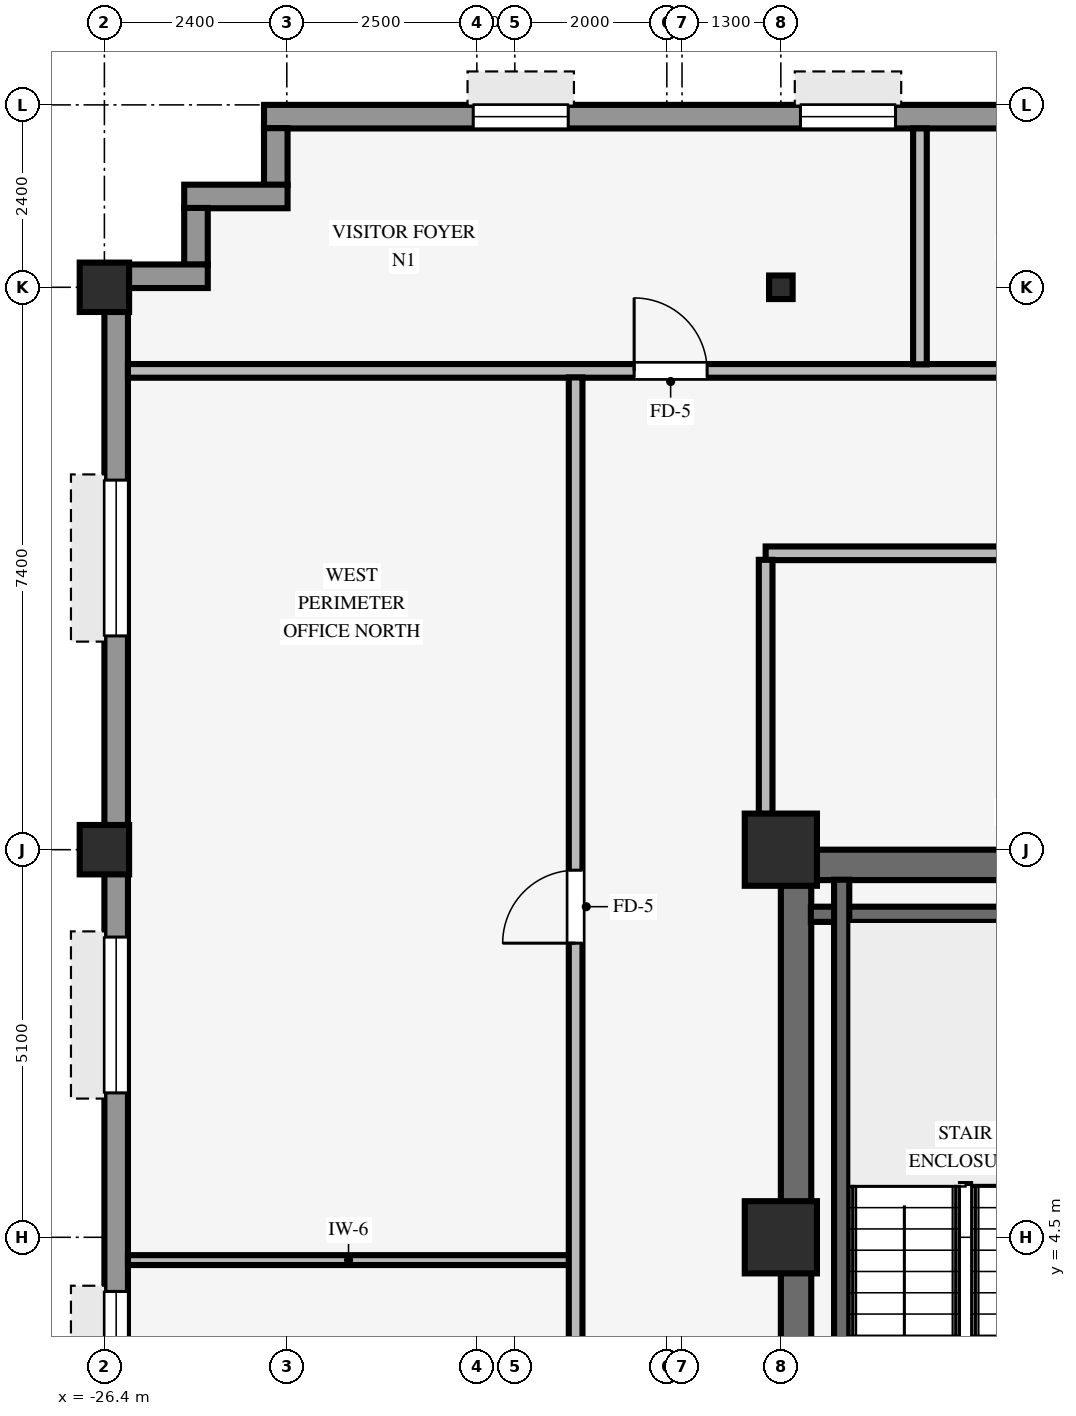
"""IFC4 building model, lengths in metres.
Left out: names, types, materials, properties, quantities, classifications, styles, units other than length and angle.
Written with IfcOpenShell. Run it as: python <this file> out.ifc"""

import sys

from ifc_helpers import new_model, si_unit, direction, frame, frame_2d, origin, origin_2d, place, context, subcontext, project, spatial, rectangle, hollow_rectangle, i_section, extrude, source, transform, mapped, element, fill, save


model = new_model("IFC4")
c1 = context("Model", 3, precision=1e-05, world=origin(), true_north=direction((0.0, 1.0)))
c2 = subcontext(c1, "Body", "Model", "MODEL_VIEW")
j1 = project(units=[si_unit("LENGTHUNIT", "METRE"), si_unit("PLANEANGLEUNIT", "RADIAN")], contexts=[c1])
p1 = place(None, origin())
s1 = spatial("IfcSite", under=j1, at=p1, CompositionType="ELEMENT")
p2 = place(p1, origin())
s2 = spatial("IfcBuilding", under=s1, at=p2, CompositionType="ELEMENT")
p3 = place(p2, frame((0.0, 0.0, 182.25)))
s3 = spatial("IfcBuildingStorey", under=s2, at=p3, CompositionType="ELEMENT", Elevation=182.25)
p4 = place(p3, frame((-17.5, 9.4, 0.0), z_axis=(0.0, 0.0, 1.0), x_axis=(1.0, 0.0, 0.0)))
e1 = element("IfcWall", 1, at=p4, inside=s3, PredefinedType="SHEAR", context=c2, shape_type="SweptSolid", body=[
    extrude(rectangle(XDim=8.5, YDim=0.4, at=frame_2d((4.25, 0.0))), origin(), (0.0, 0.0, 1.0), 3.25),
])
p5 = place(p3, frame((-17.3, -9.205, 0.0), z_axis=(0.0, 0.0, 1.0), x_axis=(0.0, 1.0, 0.0)))
e2 = element("IfcWall", 2, at=p5, inside=s3, PredefinedType="SHEAR", context=c2, shape_type="SweptSolid", body=[
    extrude(rectangle(XDim=18.41, YDim=0.4, at=frame_2d((9.205, 0.0))), origin(), (0.0, 0.0, 1.0), 3.25),
])
for number, where, z_axis, x_axis in (
    (3, (-17.5, 4.5, 0.0), (0.0, 0.0, 1.0), (1.0, 0.0, 0.0)),
    (4, (-17.5, 9.6, 0.0), (0.0, 0.0, 1.0), (1.0, 0.0, 0.0)),
):
    element("IfcColumn", number, at=place(p3, frame(where, z_axis=z_axis, x_axis=x_axis)), inside=s3, PredefinedType="COLUMN", context=c2, shape_type="SweptSolid", body=[
        extrude(rectangle(XDim=0.95, YDim=0.95, at=origin_2d()), origin(), (0.0, 0.0, 1.0), 3.25),
    ])
for number, where, z_axis, x_axis in (
    (5, (-26.4, 9.6, 0.0), (0.0, 0.0, 1.0), (1.0, 0.0, 0.0)),
    (6, (-26.4, 17.0, 0.0), (0.0, 0.0, 1.0), (1.0, 0.0, 0.0)),
):
    element("IfcColumn", number, at=place(p3, frame(where, z_axis=z_axis, x_axis=x_axis)), inside=s3, PredefinedType="COLUMN", context=c2, shape_type="SweptSolid", body=[
        extrude(hollow_rectangle(XDim=0.65, YDim=0.65, WallThickness=0.04, InnerFilletRadius=0.04, OuterFilletRadius=0.08, at=origin_2d()), origin(), (0.0, 0.0, 1.0), 3.25),
    ])
p6 = place(p3, frame((-17.5, 17.0, 0.0), z_axis=(0.0, 0.0, 1.0), x_axis=(1.0, 0.0, 0.0)))
e7 = element("IfcColumn", 7, at=p6, inside=s3, PredefinedType="COLUMN", context=c2, shape_type="SweptSolid", body=[
    extrude(i_section(OverallWidth=0.31, OverallDepth=0.31, WebThickness=0.015, FlangeThickness=0.015, FilletRadius=0.015, at=origin_2d()), origin(), (0.0, 0.0, 1.0), 3.25),
])
p7 = place(p3, frame((-24.3, 19.245, 0.0), z_axis=(0.0, 0.0, 1.0), x_axis=(1.0, 0.0, 0.0)))
e8 = element("IfcWall", 8, at=p7, inside=s3, PredefinedType="STANDARD", context=c2, shape_type="SweptSolid", body=[
    extrude(rectangle(XDim=44.8, YDim=0.31, at=frame_2d((22.4, 0.0))), origin(), (0.0, 0.0, 1.0), 2.585),
])
p8 = place(p7, frame((2.753, 0.0, 0.8)))
e9 = element("IfcOpeningElement", 9, at=p8, cuts=e8, PredefinedType="OPENING", context=c2, shape_type="SweptSolid", body=[
    extrude(rectangle(XDim=1.25, YDim=1.52, at=frame_2d((0.625, 0.76))), frame((0.0, 0.165, 0.0), z_axis=(0.0, -1.0, 0.0), x_axis=(1.0, 0.0, 0.0)), (0.0, 0.0, 1.0), 0.33),
])
p9 = place(p7, frame((7.058, 0.0, 0.8)))
e10 = element("IfcOpeningElement", 10, at=p9, cuts=e8, PredefinedType="OPENING", context=c2, shape_type="SweptSolid", body=[
    extrude(rectangle(XDim=1.25, YDim=1.52, at=frame_2d((0.625, 0.76))), frame((0.0, 0.165, 0.0), z_axis=(0.0, -1.0, 0.0), x_axis=(1.0, 0.0, 0.0)), (0.0, 0.0, 1.0), 0.33),
])
p10 = place(p7, frame((12.264, 0.0, 0.8)))
e11 = element("IfcOpeningElement", 11, at=p10, cuts=e8, PredefinedType="OPENING", context=c2, shape_type="SweptSolid", body=[
    extrude(rectangle(XDim=1.25, YDim=1.52, at=frame_2d((0.625, 0.76))), frame((0.0, 0.165, 0.0), z_axis=(0.0, -1.0, 0.0), x_axis=(1.0, 0.0, 0.0)), (0.0, 0.0, 1.0), 0.33),
])
p11 = place(p7, frame((17.919, 0.0, 0.8)))
e12 = element("IfcOpeningElement", 12, at=p11, cuts=e8, PredefinedType="OPENING", context=c2, shape_type="SweptSolid", body=[
    extrude(rectangle(XDim=1.25, YDim=1.52, at=frame_2d((0.625, 0.76))), frame((0.0, 0.165, 0.0), z_axis=(0.0, -1.0, 0.0), x_axis=(1.0, 0.0, 0.0)), (0.0, 0.0, 1.0), 0.33),
])
p12 = place(p7, frame((21.775, 0.0, 0.8)))
e13 = element("IfcOpeningElement", 13, at=p12, cuts=e8, PredefinedType="OPENING", context=c2, shape_type="SweptSolid", body=[
    extrude(rectangle(XDim=1.25, YDim=1.52, at=frame_2d((0.625, 0.76))), frame((0.0, 0.165, 0.0), z_axis=(0.0, -1.0, 0.0), x_axis=(1.0, 0.0, 0.0)), (0.0, 0.0, 1.0), 0.33),
])
p13 = place(p7, frame((26.981, 0.0, 0.8)))
e14 = element("IfcOpeningElement", 14, at=p13, cuts=e8, PredefinedType="OPENING", context=c2, shape_type="SweptSolid", body=[
    extrude(rectangle(XDim=1.25, YDim=1.52, at=frame_2d((0.625, 0.76))), frame((0.0, 0.165, 0.0), z_axis=(0.0, -1.0, 0.0), x_axis=(1.0, 0.0, 0.0)), (0.0, 0.0, 1.0), 0.33),
])
p14 = place(p7, frame((31.286, 0.0, 0.8)))
e15 = element("IfcOpeningElement", 15, at=p14, cuts=e8, PredefinedType="OPENING", context=c2, shape_type="SweptSolid", body=[
    extrude(rectangle(XDim=1.25, YDim=1.52, at=frame_2d((0.625, 0.76))), frame((0.0, 0.165, 0.0), z_axis=(0.0, -1.0, 0.0), x_axis=(1.0, 0.0, 0.0)), (0.0, 0.0, 1.0), 0.33),
])
p15 = place(p7, frame((36.042, 0.0, 0.8)))
e16 = element("IfcOpeningElement", 16, at=p15, cuts=e8, PredefinedType="OPENING", context=c2, shape_type="SweptSolid", body=[
    extrude(rectangle(XDim=1.25, YDim=1.52, at=frame_2d((0.625, 0.76))), frame((0.0, 0.165, 0.0), z_axis=(0.0, -1.0, 0.0), x_axis=(1.0, 0.0, 0.0)), (0.0, 0.0, 1.0), 0.33),
])
p16 = place(p7, frame((40.797, 0.0, 0.8)))
e17 = element("IfcOpeningElement", 17, at=p16, cuts=e8, PredefinedType="OPENING", context=c2, shape_type="SweptSolid", body=[
    extrude(rectangle(XDim=1.25, YDim=1.52, at=frame_2d((0.625, 0.76))), frame((0.0, 0.165, 0.0), z_axis=(0.0, -1.0, 0.0), x_axis=(1.0, 0.0, 0.0)), (0.0, 0.0, 1.0), 0.33),
])
p17 = place(p3, frame((-24.145, 18.346, 0.0), z_axis=(0.0, 0.0, 1.0), x_axis=(0.0, 1.0, 0.0)))
e18 = element("IfcWall", 18, at=p17, inside=s3, PredefinedType="STANDARD", context=c2, shape_type="SweptSolid", body=[
    extrude(rectangle(XDim=0.748, YDim=0.31, at=frame_2d((0.374, 0.0))), origin(), (0.0, 0.0, 1.0), 2.335),
])
p18 = place(p3, frame((-25.35, 18.195, 0.0), z_axis=(0.0, 0.0, 1.0), x_axis=(1.0, 0.0, 0.0)))
e19 = element("IfcWall", 19, at=p18, inside=s3, PredefinedType="STANDARD", context=c2, shape_type="SweptSolid", body=[
    extrude(rectangle(XDim=1.36, YDim=0.31, at=frame_2d((0.68, 0.0))), origin(), (0.0, 0.0, 1.0), 2.335),
])
p19 = place(p3, frame((-25.195, 17.296, 0.0), z_axis=(0.0, 0.0, 1.0), x_axis=(0.0, 1.0, 0.0)))
e20 = element("IfcWall", 20, at=p19, inside=s3, PredefinedType="STANDARD", context=c2, shape_type="SweptSolid", body=[
    extrude(rectangle(XDim=0.748, YDim=0.31, at=frame_2d((0.374, 0.0))), origin(), (0.0, 0.0, 1.0), 2.335),
])
p20 = place(p3, frame((-26.4, 17.145, 0.0), z_axis=(0.0, 0.0, 1.0), x_axis=(1.0, 0.0, 0.0)))
e21 = element("IfcWall", 21, at=p20, inside=s3, PredefinedType="STANDARD", context=c2, shape_type="SweptSolid", body=[
    extrude(rectangle(XDim=1.36, YDim=0.31, at=frame_2d((0.68, 0.0))), origin(), (0.0, 0.0, 1.0), 2.335),
])
p21 = place(p3, frame((-26.245, -20.794, 0.0), z_axis=(0.0, 0.0, 1.0), x_axis=(0.0, 1.0, 0.0)))
e22 = element("IfcWall", 22, at=p21, inside=s3, PredefinedType="STANDARD", context=c2, shape_type="SweptSolid", body=[
    extrude(rectangle(XDim=37.788, YDim=0.31, at=frame_2d((18.894, 0.0))), origin(), (0.0, 0.0, 1.0), 2.585),
])
p22 = place(p21, frame((7.644, 0.0, 0.8)))
e23 = element("IfcOpeningElement", 23, at=p22, cuts=e22, PredefinedType="OPENING", context=c2, shape_type="SweptSolid", body=[
    extrude(rectangle(XDim=2.05, YDim=1.52, at=frame_2d((1.025, 0.76))), frame((0.0, 0.165, 0.0), z_axis=(0.0, -1.0, 0.0), x_axis=(1.0, 0.0, 0.0)), (0.0, 0.0, 1.0), 0.33),
])
p23 = place(p21, frame((12.756, 0.0, 0.8)))
e24 = element("IfcOpeningElement", 24, at=p23, cuts=e22, PredefinedType="OPENING", context=c2, shape_type="SweptSolid", body=[
    extrude(rectangle(XDim=2.05, YDim=1.52, at=frame_2d((1.025, 0.76))), frame((0.0, 0.165, 0.0), z_axis=(0.0, -1.0, 0.0), x_axis=(1.0, 0.0, 0.0)), (0.0, 0.0, 1.0), 0.33),
])
p24 = place(p21, frame((17.869, 0.0, 0.8)))
e25 = element("IfcOpeningElement", 25, at=p24, cuts=e22, PredefinedType="OPENING", context=c2, shape_type="SweptSolid", body=[
    extrude(rectangle(XDim=2.05, YDim=1.52, at=frame_2d((1.025, 0.76))), frame((0.0, 0.165, 0.0), z_axis=(0.0, -1.0, 0.0), x_axis=(1.0, 0.0, 0.0)), (0.0, 0.0, 1.0), 0.33),
])
p25 = place(p21, frame((22.531, 0.0, 0.8)))
e26 = element("IfcOpeningElement", 26, at=p25, cuts=e22, PredefinedType="OPENING", context=c2, shape_type="SweptSolid", body=[
    extrude(rectangle(XDim=2.05, YDim=1.52, at=frame_2d((1.025, 0.76))), frame((0.0, 0.165, 0.0), z_axis=(0.0, -1.0, 0.0), x_axis=(1.0, 0.0, 0.0)), (0.0, 0.0, 1.0), 0.33),
])
p26 = place(p21, frame((27.194, 0.0, 0.8)))
e27 = element("IfcOpeningElement", 27, at=p26, cuts=e22, PredefinedType="OPENING", context=c2, shape_type="SweptSolid", body=[
    extrude(rectangle(XDim=2.05, YDim=1.52, at=frame_2d((1.025, 0.76))), frame((0.0, 0.165, 0.0), z_axis=(0.0, -1.0, 0.0), x_axis=(1.0, 0.0, 0.0)), (0.0, 0.0, 1.0), 0.33),
])
p27 = place(p21, frame((33.207, 0.0, 0.8)))
e28 = element("IfcOpeningElement", 28, at=p27, cuts=e22, PredefinedType="OPENING", context=c2, shape_type="SweptSolid", body=[
    extrude(rectangle(XDim=2.05, YDim=1.52, at=frame_2d((1.025, 0.76))), frame((0.0, 0.165, 0.0), z_axis=(0.0, -1.0, 0.0), x_axis=(1.0, 0.0, 0.0)), (0.0, 0.0, 1.0), 0.33),
])
p28 = place(p3, frame((-17.105, 8.75, 0.0), z_axis=(0.0, 0.0, 1.0), x_axis=(1.0, 0.0, 0.0)))
e29 = element("IfcWall", 29, at=p28, inside=s3, PredefinedType="SHEAR", context=c2, shape_type="SweptSolid", body=[
    extrude(rectangle(XDim=3.57, YDim=0.2, at=frame_2d((1.785, 0.0))), origin(), (0.0, 0.0, 1.0), 3.25),
])
p29 = place(p3, frame((-16.7, 1.095, 0.0), z_axis=(0.0, 0.0, 1.0), x_axis=(0.0, 1.0, 0.0)))
e30 = element("IfcWall", 30, at=p29, inside=s3, PredefinedType="SHEAR", context=c2, shape_type="SweptSolid", body=[
    extrude(rectangle(XDim=8.11, YDim=0.2, at=frame_2d((4.055, 0.0))), origin(), (0.0, 0.0, 1.0), 3.25),
])
p30 = place(p3, frame((-26.09, 4.2, 0.0), z_axis=(0.0, 0.0, 1.0), x_axis=(1.0, 0.0, 0.0)))
e31 = element("IfcWall", 31, at=p30, inside=s3, PredefinedType="PARTITIONING", context=c2, shape_type="SweptSolid", body=[
    extrude(rectangle(XDim=5.804, YDim=0.13, at=frame_2d((2.902, 0.0))), origin(), (0.0, 0.0, 1.0), 3.24),
])
p31 = place(p3, frame((-17.7, 13.5, 0.0), z_axis=(0.0, 0.0, 1.0), x_axis=(1.0, 0.0, 0.0)))
e32 = element("IfcWall", 32, at=p31, inside=s3, PredefinedType="PARTITIONING", context=c2, shape_type="SweptSolid", body=[
    extrude(rectangle(XDim=24.3, YDim=0.18, at=frame_2d((12.15, 0.0))), origin(), (0.0, 0.0, 1.0), 2.888),
])
p32 = place(p31, frame((11.67, 0.0, 0.0)))
e33 = element("IfcOpeningElement", 33, at=p32, cuts=e32, PredefinedType="OPENING", context=c2, shape_type="SweptSolid", body=[
    extrude(rectangle(XDim=0.96, YDim=2.1, at=frame_2d((0.48, 1.05))), frame((0.0, 0.1, 0.0), z_axis=(0.0, -1.0, 0.0), x_axis=(1.0, 0.0, 0.0)), (0.0, 0.0, 1.0), 0.2),
])
p33 = place(p3, frame((-26.09, 15.9, 0.0), z_axis=(0.0, 0.0, 1.0), x_axis=(1.0, 0.0, 0.0)))
e34 = element("IfcWall", 34, at=p33, inside=s3, PredefinedType="PARTITIONING", context=c2, shape_type="SweptSolid", body=[
    extrude(rectangle(XDim=48.38, YDim=0.18, at=frame_2d((24.19, 0.0))), origin(), (0.0, 0.0, 1.0), 3.24),
])
p34 = place(p33, frame((41.36, 0.0, 0.0)))
e35 = element("IfcOpeningElement", 35, at=p34, cuts=e34, PredefinedType="OPENING", context=c2, shape_type="SweptSolid", body=[
    extrude(rectangle(XDim=0.96, YDim=2.1, at=frame_2d((0.48, 1.05))), frame((0.0, 0.1, 0.0), z_axis=(0.0, -1.0, 0.0), x_axis=(1.0, 0.0, 0.0)), (0.0, 0.0, 1.0), 0.2),
])
p35 = place(p33, frame((23.35, 0.0, 0.0)))
e36 = element("IfcOpeningElement", 36, at=p35, cuts=e34, PredefinedType="OPENING", context=c2, shape_type="SweptSolid", body=[
    extrude(rectangle(XDim=0.96, YDim=2.1, at=frame_2d((0.48, 1.05))), frame((0.0, 0.1, 0.0), z_axis=(0.0, -1.0, 0.0), x_axis=(1.0, 0.0, 0.0)), (0.0, 0.0, 1.0), 0.2),
])
p36 = place(p33, frame((14.41, 0.0, 0.0)))
e37 = element("IfcOpeningElement", 37, at=p36, cuts=e34, PredefinedType="OPENING", context=c2, shape_type="SweptSolid", body=[
    extrude(rectangle(XDim=0.96, YDim=2.1, at=frame_2d((0.48, 1.05))), frame((0.0, 0.1, 0.0), z_axis=(0.0, -1.0, 0.0), x_axis=(1.0, 0.0, 0.0)), (0.0, 0.0, 1.0), 0.2),
])
p37 = place(p33, frame((30.015, 0.0, 0.0)))
e38 = element("IfcOpeningElement", 38, at=p37, cuts=e34, PredefinedType="OPENING", context=c2, shape_type="SweptSolid", body=[
    extrude(rectangle(XDim=0.96, YDim=2.1, at=frame_2d((0.48, 1.05))), frame((0.0, 0.1, 0.0), z_axis=(0.0, -1.0, 0.0), x_axis=(1.0, 0.0, 0.0)), (0.0, 0.0, 1.0), 0.2),
])
p38 = place(p33, frame((6.66, 0.0, 0.0)))
e39 = element("IfcOpeningElement", 39, at=p38, cuts=e34, PredefinedType="OPENING", context=c2, shape_type="SweptSolid", body=[
    extrude(rectangle(XDim=0.96, YDim=2.1, at=frame_2d((0.48, 1.05))), frame((0.0, 0.1, 0.0), z_axis=(0.0, -1.0, 0.0), x_axis=(1.0, 0.0, 0.0)), (0.0, 0.0, 1.0), 0.2),
])
p39 = place(p3, frame((-20.2, -15.814, 0.0), z_axis=(0.0, 0.0, 1.0), x_axis=(0.0, 1.0, 0.0)))
e40 = element("IfcWall", 40, at=p39, inside=s3, PredefinedType="PARTITIONING", context=c2, shape_type="SweptSolid", body=[
    extrude(rectangle(XDim=31.628, YDim=0.18, at=frame_2d((15.814, 0.0))), origin(), (0.0, 0.0, 1.0), 3.24),
])
p40 = place(p39, frame((10.684, 0.0, 0.0)))
e41 = element("IfcOpeningElement", 41, at=p40, cuts=e40, PredefinedType="OPENING", context=c2, shape_type="SweptSolid", body=[
    extrude(rectangle(XDim=0.96, YDim=2.1, at=frame_2d((0.48, 1.05))), frame((0.0, 0.1, 0.0), z_axis=(0.0, -1.0, 0.0), x_axis=(1.0, 0.0, 0.0)), (0.0, 0.0, 1.0), 0.2),
])
p41 = place(p39, frame((24.184, 0.0, 0.0)))
e42 = element("IfcOpeningElement", 42, at=p41, cuts=e40, PredefinedType="OPENING", context=c2, shape_type="SweptSolid", body=[
    extrude(rectangle(XDim=0.96, YDim=2.1, at=frame_2d((0.48, 1.05))), frame((0.0, 0.1, 0.0), z_axis=(0.0, -1.0, 0.0), x_axis=(1.0, 0.0, 0.0)), (0.0, 0.0, 1.0), 0.2),
])
p42 = place(p3, frame((-17.7, 10.071, 0.0), z_axis=(0.0, 0.0, 1.0), x_axis=(0.0, 1.0, 0.0)))
e43 = element("IfcWall", 43, at=p42, inside=s3, PredefinedType="PARTITIONING", context=c2, shape_type="SweptSolid", body=[
    extrude(rectangle(XDim=3.343, YDim=0.18, at=frame_2d((1.671, 0.0))), origin(), (0.0, 0.0, 1.0), 2.335),
])
p43 = place(p3, frame((-15.67, 15.986, 0.0), z_axis=(0.0, 0.0, 1.0), x_axis=(0.0, 1.0, 0.0)))
e44 = element("IfcWall", 44, at=p43, inside=s3, PredefinedType="PARTITIONING", context=c2, shape_type="SweptSolid", body=[
    extrude(rectangle(XDim=3.104, YDim=0.18, at=frame_2d((1.552, 0.0))), origin(), (0.0, 0.0, 1.0), 3.24),
])
m1 = source(origin(), c2, "Body", "SweptSolid", [
    extrude(rectangle(XDim=1.25, YDim=1.52, at=frame_2d((0.625, 0.76))), frame((0.0, 0.03, 0.0), z_axis=(0.0, -1.0, 0.0), x_axis=(1.0, 0.0, 0.0)), (0.0, 0.0, 1.0), 0.06),
])
p44 = place(p8, origin())
e45 = element("IfcWindow", 45, at=p44, inside=s3, PartitioningType="SINGLE_PANEL", PredefinedType="WINDOW", context=c2, shape_type="MappedRepresentation", body=[
    mapped(m1, transform((0.0, 0.0, 0.0), scale=1.0)),
])
fill(e9, e45)
p45 = place(p9, origin())
e46 = element("IfcWindow", 46, at=p45, inside=s3, PartitioningType="SINGLE_PANEL", PredefinedType="WINDOW", context=c2, shape_type="MappedRepresentation", body=[
    mapped(m1, transform((0.0, 0.0, 0.0), scale=1.0)),
])
fill(e10, e46)
m2 = source(origin(), c2, "Body", "SweptSolid", [
    extrude(rectangle(XDim=2.05, YDim=1.52, at=frame_2d((1.025, 0.76))), frame((0.0, 0.03, 0.0), z_axis=(0.0, -1.0, 0.0), x_axis=(1.0, 0.0, 0.0)), (0.0, 0.0, 1.0), 0.06),
])
p46 = place(p25, origin())
e47 = element("IfcWindow", 47, at=p46, inside=s3, PartitioningType="SINGLE_PANEL", PredefinedType="WINDOW", context=c2, shape_type="MappedRepresentation", body=[
    mapped(m2, transform((0.0, 0.0, 0.0), scale=1.0)),
])
fill(e26, e47)
p47 = place(p26, origin())
e48 = element("IfcWindow", 48, at=p47, inside=s3, PartitioningType="SINGLE_PANEL", PredefinedType="WINDOW", context=c2, shape_type="MappedRepresentation", body=[
    mapped(m2, transform((0.0, 0.0, 0.0), scale=1.0)),
])
fill(e27, e48)
p48 = place(p27, origin())
e49 = element("IfcWindow", 49, at=p48, inside=s3, PartitioningType="SINGLE_PANEL", PredefinedType="WINDOW", context=c2, shape_type="MappedRepresentation", body=[
    mapped(m2, transform((0.0, 0.0, 0.0), scale=1.0)),
])
fill(e28, e49)
m3 = source(origin(), c2, "Body", "SweptSolid", [
    extrude(rectangle(XDim=0.96, YDim=2.1, at=frame_2d((0.48, 1.05))), frame((0.0, 0.025, 0.0), z_axis=(0.0, -1.0, 0.0), x_axis=(1.0, 0.0, 0.0)), (0.0, 0.0, 1.0), 0.05),
])
p49 = place(p41, origin())
e50 = element("IfcDoor", 50, at=p49, inside=s3, OperationType="SINGLE_SWING_LEFT", PredefinedType="DOOR", context=c2, shape_type="MappedRepresentation", body=[
    mapped(m3, transform((0.0, 0.0, 0.0), scale=1.0)),
])
fill(e42, e50)
p50 = place(p38, origin())
e51 = element("IfcDoor", 51, at=p50, inside=s3, OperationType="SINGLE_SWING_LEFT", PredefinedType="DOOR", context=c2, shape_type="MappedRepresentation", body=[
    mapped(m3, transform((0.0, 0.0, 0.0), scale=1.0)),
])
fill(e39, e51)
save(model, sys.argv[1])
